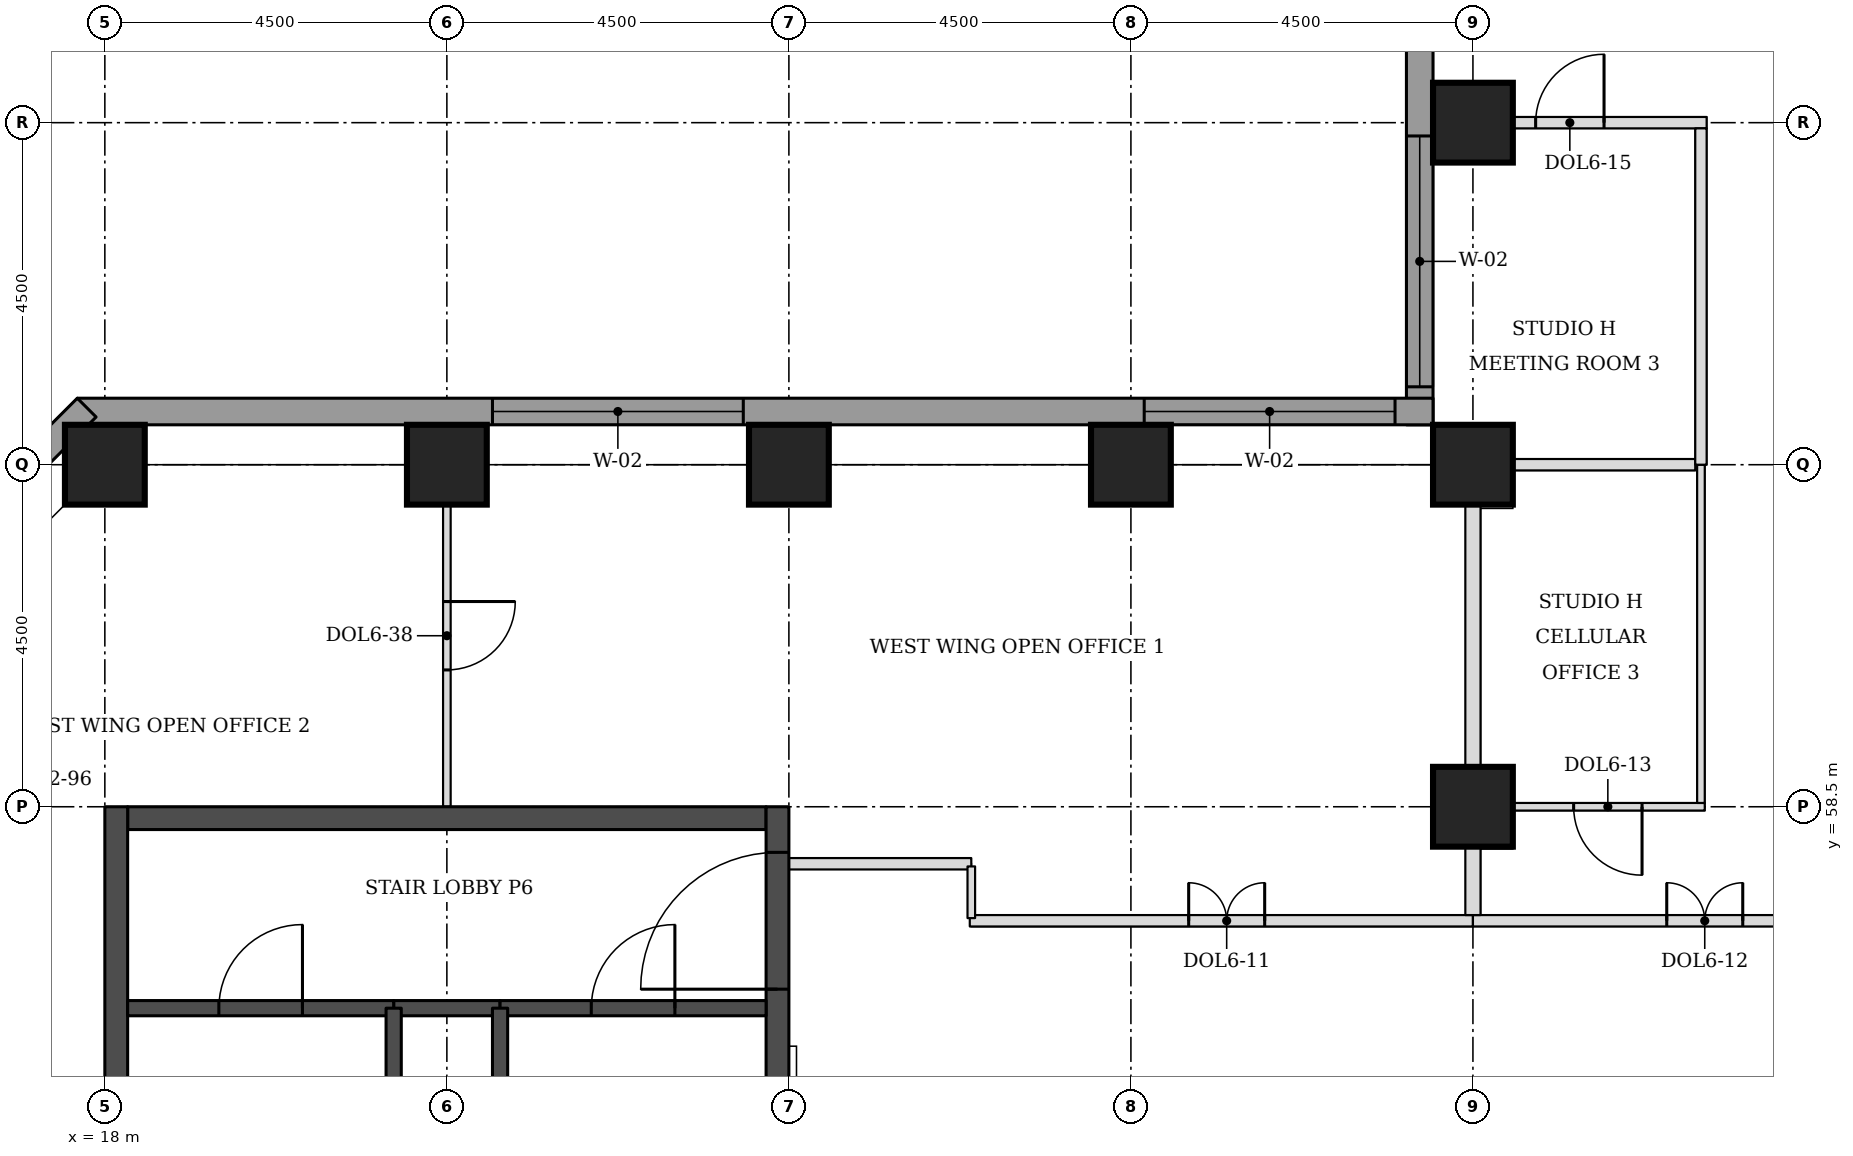
"""IFC4 building model, lengths in metres.
Left out: names, types, materials, properties, quantities, classifications, styles, units other than length and angle.
Written with IfcOpenShell. Run it as: python <this file> out.ifc"""

import sys

from ifc_helpers import new_model, si_unit, direction, frame, frame_2d, origin, origin_2d, place, context, subcontext, project, spatial, rectangle, extrude, element, fill, save


model = new_model("IFC4")
c1 = context("Model", 3, precision=1e-05, world=origin(), true_north=direction((0.0, 1.0)))
c2 = subcontext(c1, "Body", "Model", "MODEL_VIEW")
j1 = project(units=[si_unit("LENGTHUNIT", "METRE"), si_unit("PLANEANGLEUNIT", "RADIAN")], contexts=[c1])
p1 = place(None, origin())
s1 = spatial("IfcSite", under=j1, at=p1, CompositionType="ELEMENT")
p2 = place(p1, origin())
s2 = spatial("IfcBuilding", under=s1, at=p2, CompositionType="ELEMENT")
p3 = place(p2, frame((0.0, 0.0, 115.9)))
s3 = spatial("IfcBuildingStorey", under=s2, at=p3, CompositionType="ELEMENT", Elevation=115.9)
for number, where, z_axis, x_axis in (
    (1, (36.0, 58.5, 0.0), (0.0, 0.0, 1.0), (1.0, 0.0, 0.0)),
    (2, (18.0, 63.0, 0.0), (0.0, 0.0, 1.0), (1.0, 0.0, 0.0)),
    (3, (22.5, 63.0, 0.0), (0.0, 0.0, 1.0), (1.0, 0.0, 0.0)),
    (4, (27.0, 63.0, 0.0), (0.0, 0.0, 1.0), (1.0, 0.0, 0.0)),
    (5, (31.5, 63.0, 0.0), (0.0, 0.0, 1.0), (1.0, 0.0, 0.0)),
    (6, (36.0, 63.0, 0.0), (0.0, 0.0, 1.0), (1.0, 0.0, 0.0)),
    (7, (36.0, 67.5, 0.0), (0.0, 0.0, 1.0), (1.0, 0.0, 0.0)),
):
    element("IfcColumn", number, at=place(p3, frame(where, z_axis=z_axis, x_axis=x_axis)), inside=s3, PredefinedType="COLUMN", context=c2, shape_type="SweptSolid", body=[
        extrude(rectangle(XDim=1.05, YDim=1.05, at=origin_2d()), origin(), (0.0, 0.0, 1.0), 3.7),
    ])
p4 = place(p3, frame((18.3, 58.35, 0.0), z_axis=(0.0, 0.0, 1.0), x_axis=(1.0, 0.0, 0.0)))
e8 = element("IfcWall", 8, at=p4, inside=s3, PredefinedType="SHEAR", context=c2, shape_type="SweptSolid", body=[
    extrude(rectangle(XDim=8.4, YDim=0.3, at=frame_2d((4.2, 0.0))), origin(), (0.0, 0.0, 1.0), 3.7),
])
p5 = place(p3, frame((18.15, 49.5, 0.0), z_axis=(0.0, 0.0, 1.0), x_axis=(0.0, 1.0, 0.0)))
e9 = element("IfcWall", 9, at=p5, inside=s3, PredefinedType="SHEAR", context=c2, shape_type="SweptSolid", body=[
    extrude(rectangle(XDim=9.0, YDim=0.3, at=frame_2d((4.5, 0.0))), origin(), (0.0, 0.0, 1.0), 3.7),
])
p6 = place(p3, frame((26.85, 49.5, 0.0), z_axis=(0.0, 0.0, 1.0), x_axis=(0.0, 1.0, 0.0)))
e10 = element("IfcWall", 10, at=p6, inside=s3, PredefinedType="SHEAR", context=c2, shape_type="SweptSolid", body=[
    extrude(rectangle(XDim=9.0, YDim=0.3, at=frame_2d((4.5, 0.0))), origin(), (0.0, 0.0, 1.0), 3.7),
])
p7 = place(p6, frame((6.6, 0.0, 0.0)))
e11 = element("IfcOpeningElement", 11, at=p7, cuts=e10, PredefinedType="OPENING", context=c2, shape_type="SweptSolid", body=[
    extrude(rectangle(XDim=1.8, YDim=2.1, at=frame_2d((0.9, 1.05))), frame((0.0, 0.16, 0.0), z_axis=(0.0, -1.0, 0.0), x_axis=(1.0, 0.0, 0.0)), (0.0, 0.0, 1.0), 0.32),
])
p8 = place(p3, frame((35.3, 76.862, 0.0), z_axis=(0.0, 0.0, 1.0), x_axis=(0.0, -1.0, 0.0)))
e12 = element("IfcWall", 12, at=p8, inside=s3, PredefinedType="STANDARD", context=c2, shape_type="SweptSolid", body=[
    extrude(rectangle(XDim=13.337, YDim=0.35, at=frame_2d((6.669, 0.0))), origin(), (0.0, 0.0, 1.0), 3.525),
])
p9 = place(p8, frame((9.537, 0.0, 0.9)))
e13 = element("IfcOpeningElement", 13, at=p9, cuts=e12, PredefinedType="OPENING", context=c2, shape_type="SweptSolid", body=[
    extrude(rectangle(XDim=3.3, YDim=1.9, at=frame_2d((1.65, 0.95))), frame((0.0, 0.185, 0.0), z_axis=(0.0, -1.0, 0.0), x_axis=(1.0, 0.0, 0.0)), (0.0, 0.0, 1.0), 0.37),
])
p10 = place(p3, frame((35.475, 63.7, 0.0), z_axis=(0.0, 0.0, 1.0), x_axis=(-1.0, 0.0, 0.0)))
e14 = element("IfcWall", 14, at=p10, inside=s3, PredefinedType="STANDARD", context=c2, shape_type="SweptSolid", body=[
    extrude(rectangle(XDim=17.837, YDim=0.35, at=frame_2d((8.919, 0.0))), origin(), (0.0, 0.0, 1.0), 3.525),
])
p11 = place(p10, frame((0.5, 0.0, 0.9)))
e15 = element("IfcOpeningElement", 15, at=p11, cuts=e14, PredefinedType="OPENING", context=c2, shape_type="SweptSolid", body=[
    extrude(rectangle(XDim=3.3, YDim=1.9, at=frame_2d((1.65, 0.95))), frame((0.0, 0.185, 0.0), z_axis=(0.0, -1.0, 0.0), x_axis=(1.0, 0.0, 0.0)), (0.0, 0.0, 1.0), 0.37),
])
p12 = place(p10, frame((9.075, 0.0, 0.9)))
e16 = element("IfcOpeningElement", 16, at=p12, cuts=e14, PredefinedType="OPENING", context=c2, shape_type="SweptSolid", body=[
    extrude(rectangle(XDim=3.3, YDim=1.9, at=frame_2d((1.65, 0.95))), frame((0.0, 0.185, 0.0), z_axis=(0.0, -1.0, 0.0), x_axis=(1.0, 0.0, 0.0)), (0.0, 0.0, 1.0), 0.37),
])
p13 = place(p3, frame((17.761, 63.751, 0.0), z_axis=(0.0, 0.0, 1.0), x_axis=(-0.707106781187, -0.707106781187, 0.0)))
e17 = element("IfcWall", 17, at=p13, inside=s3, PredefinedType="STANDARD", context=c2, shape_type="SweptSolid", body=[
    extrude(rectangle(XDim=7.089, YDim=0.35, at=frame_2d((3.544, 0.0))), origin(), (0.0, 0.0, 1.0), 3.525),
])
p14 = place(p13, frame((1.894, 0.0, 0.9)))
e18 = element("IfcOpeningElement", 18, at=p14, cuts=e17, PredefinedType="OPENING", context=c2, shape_type="SweptSolid", body=[
    extrude(rectangle(XDim=3.3, YDim=1.9, at=frame_2d((1.65, 0.95))), frame((0.0, 0.185, 0.0), z_axis=(0.0, -1.0, 0.0), x_axis=(1.0, 0.0, 0.0)), (0.0, 0.0, 1.0), 0.37),
])
p15 = place(p3, frame((29.38, 57.0, 0.0), z_axis=(0.0, 0.0, 1.0), x_axis=(1.0, 0.0, 0.0)))
e19 = element("IfcWall", 19, at=p15, inside=s3, PredefinedType="PARTITIONING", context=c2, shape_type="SweptSolid", body=[
    extrude(rectangle(XDim=6.62, YDim=0.15, at=frame_2d((3.31, 0.0))), origin(), (0.0, 0.0, 1.0), 3.55),
])
p16 = place(p15, frame((2.88, 0.0, 0.0)))
e20 = element("IfcOpeningElement", 20, at=p16, cuts=e19, PredefinedType="OPENING", context=c2, shape_type="SweptSolid", body=[
    extrude(rectangle(XDim=1.0, YDim=2.1, at=frame_2d((0.5, 1.05))), frame((0.0, 0.085, 0.0), z_axis=(0.0, -1.0, 0.0), x_axis=(1.0, 0.0, 0.0)), (0.0, 0.0, 1.0), 0.17),
])
p17 = place(p3, frame((36.0, 57.0, 0.0), z_axis=(0.0, 0.0, 1.0), x_axis=(1.0, 0.0, 0.0)))
e21 = element("IfcWall", 21, at=p17, inside=s3, PredefinedType="PARTITIONING", context=c2, shape_type="SweptSolid", body=[
    extrude(rectangle(XDim=6.075, YDim=0.15, at=frame_2d((3.038, 0.0))), origin(), (0.0, 0.0, 1.0), 3.55),
])
p18 = place(p17, frame((2.55, 0.0, 0.0)))
e22 = element("IfcOpeningElement", 22, at=p18, cuts=e21, PredefinedType="OPENING", context=c2, shape_type="SweptSolid", body=[
    extrude(rectangle(XDim=1.0, YDim=2.1, at=frame_2d((0.5, 1.05))), frame((0.0, 0.085, 0.0), z_axis=(0.0, -1.0, 0.0), x_axis=(1.0, 0.0, 0.0)), (0.0, 0.0, 1.0), 0.17),
])
p19 = place(p3, frame((36.525, 58.5, 0.0), z_axis=(0.0, 0.0, 1.0), x_axis=(1.0, 0.0, 0.0)))
e23 = element("IfcWall", 23, at=p19, inside=s3, PredefinedType="PARTITIONING", context=c2, shape_type="SweptSolid", body=[
    extrude(rectangle(XDim=2.525, YDim=0.1, at=frame_2d((1.263, 0.0))), origin(), (0.0, 0.0, 1.0), 3.55),
])
p20 = place(p19, frame((0.8, 0.0, 0.0)))
e24 = element("IfcOpeningElement", 24, at=p20, cuts=e23, PredefinedType="OPENING", context=c2, shape_type="SweptSolid", body=[
    extrude(rectangle(XDim=0.9, YDim=2.1, at=frame_2d((0.45, 1.05))), frame((0.0, 0.06, 0.0), z_axis=(0.0, -1.0, 0.0), x_axis=(1.0, 0.0, 0.0)), (0.0, 0.0, 1.0), 0.12),
])
p21 = place(p3, frame((36.525, 63.0, 0.0), z_axis=(0.0, 0.0, 1.0), x_axis=(1.0, 0.0, 0.0)))
e25 = element("IfcWall", 25, at=p21, inside=s3, PredefinedType="PARTITIONING", context=c2, shape_type="SweptSolid", body=[
    extrude(rectangle(XDim=2.4, YDim=0.15, at=frame_2d((1.2, 0.0))), origin(), (0.0, 0.0, 1.0), 3.55),
])
p22 = place(p3, frame((35.475, 67.5, 0.0), z_axis=(0.0, 0.0, 1.0), x_axis=(1.0, 0.0, 0.0)))
e26 = element("IfcWall", 26, at=p22, inside=s3, PredefinedType="PARTITIONING", context=c2, shape_type="SweptSolid", body=[
    extrude(rectangle(XDim=3.6, YDim=0.15, at=frame_2d((1.8, 0.0))), origin(), (0.0, 0.0, 1.0), 3.55),
])
p23 = place(p22, frame((1.35, 0.0, 0.0)))
e27 = element("IfcOpeningElement", 27, at=p23, cuts=e26, PredefinedType="OPENING", context=c2, shape_type="SweptSolid", body=[
    extrude(rectangle(XDim=0.9, YDim=2.1, at=frame_2d((0.45, 1.05))), frame((0.0, 0.085, 0.0), z_axis=(0.0, -1.0, 0.0), x_axis=(1.0, 0.0, 0.0)), (0.0, 0.0, 1.0), 0.17),
])
p24 = place(p3, frame((36.0, 57.075, 0.0), z_axis=(0.0, 0.0, 1.0), x_axis=(0.0, 1.0, 0.0)))
e28 = element("IfcWall", 28, at=p24, inside=s3, PredefinedType="PARTITIONING", context=c2, shape_type="SweptSolid", body=[
    extrude(rectangle(XDim=0.9, YDim=0.2, at=frame_2d((0.45, 0.0))), origin(), (0.0, 0.0, 1.0), 2.8),
])
p25 = place(p3, frame((39.0, 58.55, 0.0), z_axis=(0.0, 0.0, 1.0), x_axis=(0.0, 1.0, 0.0)))
e29 = element("IfcWall", 29, at=p25, inside=s3, PredefinedType="PARTITIONING", context=c2, shape_type="SweptSolid", body=[
    extrude(rectangle(XDim=4.45, YDim=0.1, at=frame_2d((2.225, 0.0))), origin(), (0.0, 0.0, 1.0), 3.55),
])
p26 = place(p3, frame((36.0, 58.995, 0.0), z_axis=(0.0, 0.0, 1.0), x_axis=(0.0, 1.0, 0.0)))
e30 = element("IfcWall", 30, at=p26, inside=s3, PredefinedType="PARTITIONING", context=c2, shape_type="SweptSolid", body=[
    extrude(rectangle(XDim=3.48, YDim=0.2, at=frame_2d((1.74, 0.0))), origin(), (0.0, 0.0, 1.0), 2.8),
])
p27 = place(p3, frame((39.0, 63.0, 0.0), z_axis=(0.0, 0.0, 1.0), x_axis=(0.0, 1.0, 0.0)))
e31 = element("IfcWall", 31, at=p27, inside=s3, PredefinedType="PARTITIONING", context=c2, shape_type="SweptSolid", body=[
    extrude(rectangle(XDim=4.425, YDim=0.15, at=frame_2d((2.212, 0.0))), origin(), (0.0, 0.0, 1.0), 3.55),
])
p28 = place(p3, frame((22.5, 63.0, 0.0), z_axis=(0.0, 0.0, 1.0), x_axis=(0.0, -1.0, 0.0)))
e32 = element("IfcWall", 32, at=p28, inside=s3, PredefinedType="PARTITIONING", context=c2, shape_type="SweptSolid", body=[
    extrude(rectangle(XDim=4.5, YDim=0.1, at=frame_2d((2.25, 0.0))), origin(), (0.0, 0.0, 1.0), 3.55),
])
p29 = place(p28, frame((1.8, 0.0, 0.0)))
e33 = element("IfcOpeningElement", 33, at=p29, cuts=e32, PredefinedType="OPENING", context=c2, shape_type="SweptSolid", body=[
    extrude(rectangle(XDim=0.9, YDim=2.1, at=frame_2d((0.45, 1.05))), frame((0.0, 0.06, 0.0), z_axis=(0.0, -1.0, 0.0), x_axis=(1.0, 0.0, 0.0)), (0.0, 0.0, 1.0), 0.12),
])
p30 = place(p3, frame((27.0, 57.75, 0.0), z_axis=(0.0, 0.0, 1.0), x_axis=(1.0, 0.0, 0.0)))
e34 = element("IfcWall", 34, at=p30, inside=s3, PredefinedType="PARTITIONING", context=c2, shape_type="SweptSolid", body=[
    extrude(rectangle(XDim=2.4, YDim=0.15, at=frame_2d((1.2, 0.0))), origin(), (0.0, 0.0, 1.0), 3.55),
])
p31 = place(p3, frame((29.4, 57.715, 0.0), z_axis=(0.0, 0.0, 1.0), x_axis=(0.0, -1.0, 0.0)))
e35 = element("IfcWall", 35, at=p31, inside=s3, PredefinedType="PARTITIONING", context=c2, shape_type="SweptSolid", body=[
    extrude(rectangle(XDim=0.68, YDim=0.1, at=frame_2d((0.34, 0.0))), origin(), (0.0, 0.0, 1.0), 3.55),
])
p32 = place(p3, frame((21.8, 55.85, 0.0), z_axis=(0.0, 0.0, 1.0), x_axis=(1.0, 0.0, 0.0)))
e36 = element("IfcWall", 36, at=p32, inside=s3, PredefinedType="SOLIDWALL", context=c2, shape_type="SweptSolid", body=[
    extrude(rectangle(XDim=1.4, YDim=0.2, at=frame_2d((0.7, 0.0))), origin(), (0.0, 0.0, 1.0), 3.55),
])
p33 = place(p3, frame((18.3, 55.85, 0.0), z_axis=(0.0, 0.0, 1.0), x_axis=(1.0, 0.0, 0.0)))
e37 = element("IfcWall", 37, at=p33, inside=s3, PredefinedType="SOLIDWALL", context=c2, shape_type="SweptSolid", body=[
    extrude(rectangle(XDim=3.5, YDim=0.2, at=frame_2d((1.75, 0.0))), origin(), (0.0, 0.0, 1.0), 3.55),
])
p34 = place(p33, frame((1.2, 0.0, 0.0)))
e38 = element("IfcOpeningElement", 38, at=p34, cuts=e37, PredefinedType="OPENING", context=c2, shape_type="SweptSolid", body=[
    extrude(rectangle(XDim=1.1, YDim=2.1, at=frame_2d((0.55, 1.05))), frame((0.0, 0.11, 0.0), z_axis=(0.0, -1.0, 0.0), x_axis=(1.0, 0.0, 0.0)), (0.0, 0.0, 1.0), 0.22),
])
p35 = place(p3, frame((23.2, 55.85, 0.0), z_axis=(0.0, 0.0, 1.0), x_axis=(1.0, 0.0, 0.0)))
e39 = element("IfcWall", 39, at=p35, inside=s3, PredefinedType="SOLIDWALL", context=c2, shape_type="SweptSolid", body=[
    extrude(rectangle(XDim=3.5, YDim=0.2, at=frame_2d((1.75, 0.0))), origin(), (0.0, 0.0, 1.0), 3.55),
])
p36 = place(p35, frame((1.2, 0.0, 0.0)))
e40 = element("IfcOpeningElement", 40, at=p36, cuts=e39, PredefinedType="OPENING", context=c2, shape_type="SweptSolid", body=[
    extrude(rectangle(XDim=1.1, YDim=2.1, at=frame_2d((0.55, 1.05))), frame((0.0, 0.11, 0.0), z_axis=(0.0, -1.0, 0.0), x_axis=(1.0, 0.0, 0.0)), (0.0, 0.0, 1.0), 0.22),
])
for number, where, z_axis, x_axis in (
    (41, (21.8, 49.8, 0.0), (0.0, 0.0, 1.0), (0.0, 1.0, 0.0)),
    (42, (23.2, 49.8, 0.0), (0.0, 0.0, 1.0), (0.0, 1.0, 0.0)),
):
    element("IfcWall", number, at=place(p3, frame(where, z_axis=z_axis, x_axis=x_axis)), inside=s3, PredefinedType="SOLIDWALL", context=c2, shape_type="SweptSolid", body=[
        extrude(rectangle(XDim=6.05, YDim=0.2, at=frame_2d((3.025, 0.0))), origin(), (0.0, 0.0, 1.0), 3.55),
    ])
p37 = place(p9, origin())
e43 = element("IfcWindow", 43, at=p37, inside=s3, PartitioningType="SINGLE_PANEL", PredefinedType="WINDOW", context=c2, shape_type="SweptSolid", body=[
    extrude(rectangle(XDim=3.3, YDim=1.9, at=frame_2d((1.65, 0.95))), frame((0.0, 0.085, 0.0), z_axis=(0.0, -1.0, 0.0), x_axis=(1.0, 0.0, 0.0)), (0.0, 0.0, 1.0), 0.06),
])
fill(e13, e43)
p38 = place(p11, origin())
e44 = element("IfcWindow", 44, at=p38, inside=s3, PartitioningType="SINGLE_PANEL", PredefinedType="WINDOW", context=c2, shape_type="SweptSolid", body=[
    extrude(rectangle(XDim=3.3, YDim=1.9, at=frame_2d((1.65, 0.95))), frame((0.0, 0.085, 0.0), z_axis=(0.0, -1.0, 0.0), x_axis=(1.0, 0.0, 0.0)), (0.0, 0.0, 1.0), 0.06),
])
fill(e15, e44)
p39 = place(p12, origin())
e45 = element("IfcWindow", 45, at=p39, inside=s3, PartitioningType="SINGLE_PANEL", PredefinedType="WINDOW", context=c2, shape_type="SweptSolid", body=[
    extrude(rectangle(XDim=3.3, YDim=1.9, at=frame_2d((1.65, 0.95))), frame((0.0, 0.085, 0.0), z_axis=(0.0, -1.0, 0.0), x_axis=(1.0, 0.0, 0.0)), (0.0, 0.0, 1.0), 0.06),
])
fill(e16, e45)
p40 = place(p18, origin())
e46 = element("IfcDoor", 46, at=p40, inside=s3, OperationType="DOUBLE_DOOR_SINGLE_SWING", PredefinedType="DOOR", context=c2, shape_type="SweptSolid", body=[
    extrude(rectangle(XDim=1.0, YDim=2.1, at=frame_2d((0.5, 1.05))), frame((0.0, 0.025, 0.0), z_axis=(0.0, -1.0, 0.0), x_axis=(1.0, 0.0, 0.0)), (0.0, 0.0, 1.0), 0.05),
])
fill(e22, e46)
p41 = place(p20, frame((0.9, 0.0, 0.0), z_axis=(0.0, 0.0, 1.0), x_axis=(-1.0, 0.0, 0.0)))
e47 = element("IfcDoor", 47, at=p41, inside=s3, OperationType="SINGLE_SWING_LEFT", PredefinedType="DOOR", context=c2, shape_type="SweptSolid", body=[
    extrude(rectangle(XDim=0.9, YDim=2.1, at=frame_2d((0.45, 1.05))), frame((0.0, 0.025, 0.0), z_axis=(0.0, -1.0, 0.0), x_axis=(1.0, 0.0, 0.0)), (0.0, 0.0, 1.0), 0.05),
])
fill(e24, e47)
p42 = place(p23, origin())
e48 = element("IfcDoor", 48, at=p42, inside=s3, OperationType="SINGLE_SWING_RIGHT", PredefinedType="DOOR", context=c2, shape_type="SweptSolid", body=[
    extrude(rectangle(XDim=0.9, YDim=2.1, at=frame_2d((0.45, 1.05))), frame((0.0, 0.025, 0.0), z_axis=(0.0, -1.0, 0.0), x_axis=(1.0, 0.0, 0.0)), (0.0, 0.0, 1.0), 0.05),
])
fill(e27, e48)
p43 = place(p16, origin())
e49 = element("IfcDoor", 49, at=p43, inside=s3, OperationType="DOUBLE_DOOR_SINGLE_SWING", PredefinedType="DOOR", context=c2, shape_type="SweptSolid", body=[
    extrude(rectangle(XDim=1.0, YDim=2.1, at=frame_2d((0.5, 1.05))), frame((0.0, 0.025, 0.0), z_axis=(0.0, -1.0, 0.0), x_axis=(1.0, 0.0, 0.0)), (0.0, 0.0, 1.0), 0.05),
])
fill(e20, e49)
p44 = place(p29, origin())
e50 = element("IfcDoor", 50, at=p44, inside=s3, OperationType="SINGLE_SWING_LEFT", PredefinedType="DOOR", context=c2, shape_type="SweptSolid", body=[
    extrude(rectangle(XDim=0.9, YDim=2.1, at=frame_2d((0.45, 1.05))), frame((0.0, 0.025, 0.0), z_axis=(0.0, -1.0, 0.0), x_axis=(1.0, 0.0, 0.0)), (0.0, 0.0, 1.0), 0.05),
])
fill(e33, e50)
p45 = place(p34, origin())
e51 = element("IfcDoor", 51, at=p45, inside=s3, OperationType="SINGLE_SWING_RIGHT", PredefinedType="DOOR", context=c2, shape_type="SweptSolid", body=[
    extrude(rectangle(XDim=1.1, YDim=2.1, at=frame_2d((0.55, 1.05))), frame((0.0, 0.025, 0.0), z_axis=(0.0, -1.0, 0.0), x_axis=(1.0, 0.0, 0.0)), (0.0, 0.0, 1.0), 0.05),
])
fill(e38, e51)
p46 = place(p36, origin())
e52 = element("IfcDoor", 52, at=p46, inside=s3, OperationType="SINGLE_SWING_RIGHT", PredefinedType="DOOR", context=c2, shape_type="SweptSolid", body=[
    extrude(rectangle(XDim=1.1, YDim=2.1, at=frame_2d((0.55, 1.05))), frame((0.0, 0.025, 0.0), z_axis=(0.0, -1.0, 0.0), x_axis=(1.0, 0.0, 0.0)), (0.0, 0.0, 1.0), 0.05),
])
fill(e40, e52)
p47 = place(p7, origin())
e53 = element("IfcDoor", 53, at=p47, inside=s3, OperationType="SINGLE_SWING_LEFT", PredefinedType="DOOR", context=c2, shape_type="SweptSolid", body=[
    extrude(rectangle(XDim=1.8, YDim=2.1, at=frame_2d((0.9, 1.05))), frame((0.0, 0.025, 0.0), z_axis=(0.0, -1.0, 0.0), x_axis=(1.0, 0.0, 0.0)), (0.0, 0.0, 1.0), 0.05),
])
fill(e11, e53)
save(model, sys.argv[1])
